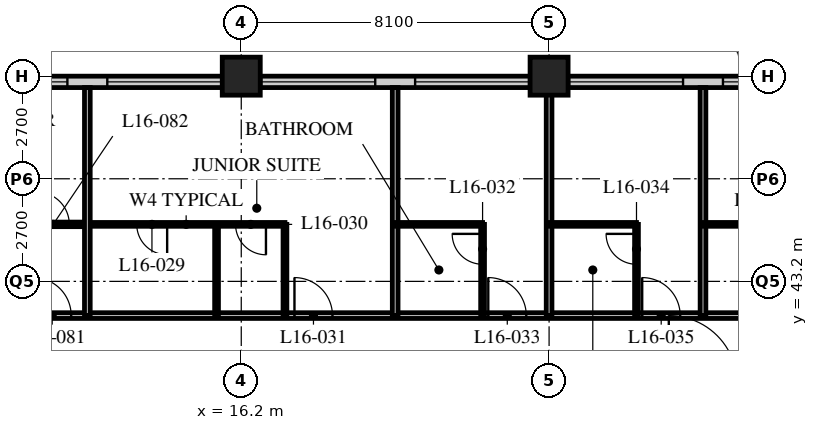
"""IFC4 building model, lengths in metres.
Left out: names, types, materials, properties, quantities, classifications, styles, units other than length and angle.
Written with IfcOpenShell. Run it as: python <this file> out.ifc"""

import sys

from ifc_helpers import new_model, si_unit, direction, frame, frame_2d, origin, origin_2d, place, context, subcontext, project, spatial, rectangle, hollow_rectangle, extrude, element, fill, save


model = new_model("IFC4")
c1 = context("Model", 3, precision=1e-05, world=origin(), true_north=direction((0.0, 1.0)))
c2 = subcontext(c1, "Body", "Model", "MODEL_VIEW")
j1 = project(units=[si_unit("LENGTHUNIT", "METRE"), si_unit("PLANEANGLEUNIT", "RADIAN")], contexts=[c1])
p1 = place(None, origin())
s1 = spatial("IfcSite", under=j1, at=p1, CompositionType="ELEMENT")
p2 = place(p1, origin())
s2 = spatial("IfcBuilding", under=s1, at=p2, CompositionType="ELEMENT")
p3 = place(p2, frame((0.0, 0.0, 67.0)))
s3 = spatial("IfcBuildingStorey", under=s2, at=p3, CompositionType="ELEMENT", Elevation=67.0)
for number, where, z_axis, x_axis in (
    (1, (16.2, 48.6, 0.0), (0.0, 0.0, 1.0), (1.0, 0.0, 0.0)),
    (2, (24.3, 48.6, 0.0), (0.0, 0.0, 1.0), (1.0, 0.0, 0.0)),
):
    element("IfcColumn", number, at=place(p3, frame(where, z_axis=z_axis, x_axis=x_axis)), inside=s3, PredefinedType="COLUMN", context=c2, shape_type="SweptSolid", body=[
        extrude(hollow_rectangle(XDim=1.0, YDim=1.0, WallThickness=0.1, at=origin_2d()), origin(), (0.0, 0.0, 1.0), 3.4),
    ])
p4 = place(p3, frame((48.3, 48.45, 0.0), z_axis=(0.0, 0.0, 1.0), x_axis=(-1.0, 0.0, 0.0)))
e3 = element("IfcWall", 3, at=p4, inside=s3, PredefinedType="SOLIDWALL", context=c2, shape_type="SweptSolid", body=[
    extrude(rectangle(XDim=40.2, YDim=0.3, at=frame_2d((20.1, 0.0))), origin(), (0.0, 0.0, 1.0), 3.19),
])
p5 = place(p4, frame((0.225, 0.0, 0.9)))
e4 = element("IfcOpeningElement", 4, at=p5, cuts=e3, PredefinedType="OPENING", context=c2, shape_type="SweptSolid", body=[
    extrude(rectangle(XDim=3.0, YDim=2.0, at=frame_2d((1.5, 1.0))), frame((0.0, 0.16, 0.0), z_axis=(0.0, -1.0, 0.0), x_axis=(1.0, 0.0, 0.0)), (0.0, 0.0, 1.0), 0.32),
])
p6 = place(p4, frame((4.275, 0.0, 0.9)))
e5 = element("IfcOpeningElement", 5, at=p6, cuts=e3, PredefinedType="OPENING", context=c2, shape_type="SweptSolid", body=[
    extrude(rectangle(XDim=3.0, YDim=2.0, at=frame_2d((1.5, 1.0))), frame((0.0, 0.16, 0.0), z_axis=(0.0, -1.0, 0.0), x_axis=(1.0, 0.0, 0.0)), (0.0, 0.0, 1.0), 0.32),
])
p7 = place(p4, frame((8.325, 0.0, 0.9)))
e6 = element("IfcOpeningElement", 6, at=p7, cuts=e3, PredefinedType="OPENING", context=c2, shape_type="SweptSolid", body=[
    extrude(rectangle(XDim=3.0, YDim=2.0, at=frame_2d((1.5, 1.0))), frame((0.0, 0.16, 0.0), z_axis=(0.0, -1.0, 0.0), x_axis=(1.0, 0.0, 0.0)), (0.0, 0.0, 1.0), 0.32),
])
p8 = place(p4, frame((12.375, 0.0, 0.9)))
e7 = element("IfcOpeningElement", 7, at=p8, cuts=e3, PredefinedType="OPENING", context=c2, shape_type="SweptSolid", body=[
    extrude(rectangle(XDim=3.0, YDim=2.0, at=frame_2d((1.5, 1.0))), frame((0.0, 0.16, 0.0), z_axis=(0.0, -1.0, 0.0), x_axis=(1.0, 0.0, 0.0)), (0.0, 0.0, 1.0), 0.32),
])
p9 = place(p4, frame((16.425, 0.0, 0.9)))
e8 = element("IfcOpeningElement", 8, at=p9, cuts=e3, PredefinedType="OPENING", context=c2, shape_type="SweptSolid", body=[
    extrude(rectangle(XDim=3.0, YDim=2.0, at=frame_2d((1.5, 1.0))), frame((0.0, 0.16, 0.0), z_axis=(0.0, -1.0, 0.0), x_axis=(1.0, 0.0, 0.0)), (0.0, 0.0, 1.0), 0.32),
])
p10 = place(p4, frame((20.475, 0.0, 0.9)))
e9 = element("IfcOpeningElement", 9, at=p10, cuts=e3, PredefinedType="OPENING", context=c2, shape_type="SweptSolid", body=[
    extrude(rectangle(XDim=3.0, YDim=2.0, at=frame_2d((1.5, 1.0))), frame((0.0, 0.16, 0.0), z_axis=(0.0, -1.0, 0.0), x_axis=(1.0, 0.0, 0.0)), (0.0, 0.0, 1.0), 0.32),
])
p11 = place(p4, frame((24.525, 0.0, 0.9)))
e10 = element("IfcOpeningElement", 10, at=p11, cuts=e3, PredefinedType="OPENING", context=c2, shape_type="SweptSolid", body=[
    extrude(rectangle(XDim=3.0, YDim=2.0, at=frame_2d((1.5, 1.0))), frame((0.0, 0.16, 0.0), z_axis=(0.0, -1.0, 0.0), x_axis=(1.0, 0.0, 0.0)), (0.0, 0.0, 1.0), 0.32),
])
p12 = place(p4, frame((28.575, 0.0, 0.9)))
e11 = element("IfcOpeningElement", 11, at=p12, cuts=e3, PredefinedType="OPENING", context=c2, shape_type="SweptSolid", body=[
    extrude(rectangle(XDim=3.0, YDim=2.0, at=frame_2d((1.5, 1.0))), frame((0.0, 0.16, 0.0), z_axis=(0.0, -1.0, 0.0), x_axis=(1.0, 0.0, 0.0)), (0.0, 0.0, 1.0), 0.32),
])
p13 = place(p4, frame((32.625, 0.0, 0.9)))
e12 = element("IfcOpeningElement", 12, at=p13, cuts=e3, PredefinedType="OPENING", context=c2, shape_type="SweptSolid", body=[
    extrude(rectangle(XDim=3.0, YDim=2.0, at=frame_2d((1.5, 1.0))), frame((0.0, 0.16, 0.0), z_axis=(0.0, -1.0, 0.0), x_axis=(1.0, 0.0, 0.0)), (0.0, 0.0, 1.0), 0.32),
])
p14 = place(p4, frame((36.675, 0.0, 0.9)))
e13 = element("IfcOpeningElement", 13, at=p14, cuts=e3, PredefinedType="OPENING", context=c2, shape_type="SweptSolid", body=[
    extrude(rectangle(XDim=3.0, YDim=2.0, at=frame_2d((1.5, 1.0))), frame((0.0, 0.16, 0.0), z_axis=(0.0, -1.0, 0.0), x_axis=(1.0, 0.0, 0.0)), (0.0, 0.0, 1.0), 0.32),
])
p15 = place(p3, frame((8.1, 42.3, 0.0), z_axis=(0.0, 0.0, 1.0), x_axis=(1.0, 0.0, 0.0)))
e14 = element("IfcWall", 14, at=p15, inside=s3, PredefinedType="PARTITIONING", context=c2, shape_type="SweptSolid", body=[
    extrude(rectangle(XDim=36.45, YDim=0.15, at=frame_2d((18.225, 0.0))), origin(), (0.0, 0.0, 1.0), 3.19),
])
p16 = place(p15, frame((9.5, 0.0, 0.0)))
e15 = element("IfcOpeningElement", 15, at=p16, cuts=e14, PredefinedType="OPENING", context=c2, shape_type="SweptSolid", body=[
    extrude(rectangle(XDim=1.0, YDim=2.1, at=frame_2d((0.5, 1.05))), frame((0.0, 0.085, 0.0), z_axis=(0.0, -1.0, 0.0), x_axis=(1.0, 0.0, 0.0)), (0.0, 0.0, 1.0), 0.17),
])
p17 = place(p15, frame((14.6, 0.0, 0.0)))
e16 = element("IfcOpeningElement", 16, at=p17, cuts=e14, PredefinedType="OPENING", context=c2, shape_type="SweptSolid", body=[
    extrude(rectangle(XDim=1.0, YDim=2.1, at=frame_2d((0.5, 1.05))), frame((0.0, 0.085, 0.0), z_axis=(0.0, -1.0, 0.0), x_axis=(1.0, 0.0, 0.0)), (0.0, 0.0, 1.0), 0.17),
])
p18 = place(p15, frame((18.65, 0.0, 0.0)))
e17 = element("IfcOpeningElement", 17, at=p18, cuts=e14, PredefinedType="OPENING", context=c2, shape_type="SweptSolid", body=[
    extrude(rectangle(XDim=1.0, YDim=2.1, at=frame_2d((0.5, 1.05))), frame((0.0, 0.085, 0.0), z_axis=(0.0, -1.0, 0.0), x_axis=(1.0, 0.0, 0.0)), (0.0, 0.0, 1.0), 0.17),
])
p19 = place(p15, frame((25.7, 0.0, 0.0)))
e18 = element("IfcOpeningElement", 18, at=p19, cuts=e14, PredefinedType="OPENING", context=c2, shape_type="SweptSolid", body=[
    extrude(rectangle(XDim=1.0, YDim=2.1, at=frame_2d((0.5, 1.05))), frame((0.0, 0.085, 0.0), z_axis=(0.0, -1.0, 0.0), x_axis=(1.0, 0.0, 0.0)), (0.0, 0.0, 1.0), 0.17),
])
p20 = place(p15, frame((30.8, 0.0, 0.0)))
e19 = element("IfcOpeningElement", 19, at=p20, cuts=e14, PredefinedType="OPENING", context=c2, shape_type="SweptSolid", body=[
    extrude(rectangle(XDim=1.0, YDim=2.1, at=frame_2d((0.5, 1.05))), frame((0.0, 0.085, 0.0), z_axis=(0.0, -1.0, 0.0), x_axis=(1.0, 0.0, 0.0)), (0.0, 0.0, 1.0), 0.17),
])
p21 = place(p15, frame((32.825, 0.0, 0.0)))
e20 = element("IfcOpeningElement", 20, at=p21, cuts=e14, PredefinedType="OPENING", context=c2, shape_type="SweptSolid", body=[
    extrude(rectangle(XDim=1.0, YDim=2.1, at=frame_2d((0.5, 1.05))), frame((0.0, 0.085, 0.0), z_axis=(0.0, -1.0, 0.0), x_axis=(1.0, 0.0, 0.0)), (0.0, 0.0, 1.0), 0.17),
])
p22 = place(p15, frame((2.625, 0.0, 0.0)))
e21 = element("IfcOpeningElement", 21, at=p22, cuts=e14, PredefinedType="OPENING", context=c2, shape_type="SweptSolid", body=[
    extrude(rectangle(XDim=1.0, YDim=2.1, at=frame_2d((0.5, 1.05))), frame((0.0, 0.085, 0.0), z_axis=(0.0, -1.0, 0.0), x_axis=(1.0, 0.0, 0.0)), (0.0, 0.0, 1.0), 0.17),
])
p23 = place(p3, frame((12.15, 44.7, 0.0), z_axis=(0.0, 0.0, 1.0), x_axis=(1.0, 0.0, 0.0)))
e22 = element("IfcWall", 22, at=p23, inside=s3, PredefinedType="PARTITIONING", context=c2, shape_type="SweptSolid", body=[
    extrude(rectangle(XDim=5.2, YDim=0.1, at=frame_2d((2.6, 0.0))), origin(), (0.0, 0.0, 1.0), 3.19),
])
p24 = place(p23, frame((1.3, 0.0, 0.0)))
e23 = element("IfcOpeningElement", 23, at=p24, cuts=e22, PredefinedType="OPENING", context=c2, shape_type="SweptSolid", body=[
    extrude(rectangle(XDim=0.8, YDim=2.1, at=frame_2d((0.4, 1.05))), frame((0.0, 0.06, 0.0), z_axis=(0.0, -1.0, 0.0), x_axis=(1.0, 0.0, 0.0)), (0.0, 0.0, 1.0), 0.12),
])
p25 = place(p23, frame((3.9, 0.0, 0.0)))
e24 = element("IfcOpeningElement", 24, at=p25, cuts=e22, PredefinedType="OPENING", context=c2, shape_type="SweptSolid", body=[
    extrude(rectangle(XDim=0.8, YDim=2.1, at=frame_2d((0.4, 1.05))), frame((0.0, 0.06, 0.0), z_axis=(0.0, -1.0, 0.0), x_axis=(1.0, 0.0, 0.0)), (0.0, 0.0, 1.0), 0.12),
])
for number, where, z_axis, x_axis in (
    (25, (15.55, 42.3, 0.0), (0.0, 0.0, 1.0), (0.0, 1.0, 0.0)),
    (26, (17.35, 42.3, 0.0), (0.0, 0.0, 1.0), (0.0, 1.0, 0.0)),
):
    element("IfcWall", number, at=place(p3, frame(where, z_axis=z_axis, x_axis=x_axis)), inside=s3, PredefinedType="PARTITIONING", context=c2, shape_type="SweptSolid", body=[
        extrude(rectangle(XDim=2.4, YDim=0.1, at=frame_2d((1.2, 0.0))), origin(), (0.0, 0.0, 1.0), 3.19),
    ])
p26 = place(p3, frame((20.25, 42.3, 0.0), z_axis=(0.0, 0.0, 1.0), x_axis=(0.0, 1.0, 0.0)))
e27 = element("IfcWall", 27, at=p26, inside=s3, PredefinedType="PARTITIONING", context=c2, shape_type="SweptSolid", body=[
    extrude(rectangle(XDim=6.0, YDim=0.15, at=frame_2d((3.0, 0.0))), origin(), (0.0, 0.0, 1.0), 3.19),
])
p27 = place(p3, frame((20.25, 44.7, 0.0), z_axis=(0.0, 0.0, 1.0), x_axis=(1.0, 0.0, 0.0)))
e28 = element("IfcWall", 28, at=p27, inside=s3, PredefinedType="PARTITIONING", context=c2, shape_type="SweptSolid", body=[
    extrude(rectangle(XDim=2.3, YDim=0.1, at=frame_2d((1.15, 0.0))), origin(), (0.0, 0.0, 1.0), 3.19),
])
p28 = place(p3, frame((22.55, 42.3, 0.0), z_axis=(0.0, 0.0, 1.0), x_axis=(0.0, 1.0, 0.0)))
e29 = element("IfcWall", 29, at=p28, inside=s3, PredefinedType="PARTITIONING", context=c2, shape_type="SweptSolid", body=[
    extrude(rectangle(XDim=2.4, YDim=0.1, at=frame_2d((1.2, 0.0))), origin(), (0.0, 0.0, 1.0), 3.19),
])
p29 = place(p28, frame((1.35, 0.0, 0.0)))
e30 = element("IfcOpeningElement", 30, at=p29, cuts=e29, PredefinedType="OPENING", context=c2, shape_type="SweptSolid", body=[
    extrude(rectangle(XDim=0.8, YDim=2.1, at=frame_2d((0.4, 1.05))), frame((0.0, 0.06, 0.0), z_axis=(0.0, -1.0, 0.0), x_axis=(1.0, 0.0, 0.0)), (0.0, 0.0, 1.0), 0.12),
])
p30 = place(p3, frame((24.3, 42.3, 0.0), z_axis=(0.0, 0.0, 1.0), x_axis=(0.0, 1.0, 0.0)))
e31 = element("IfcWall", 31, at=p30, inside=s3, PredefinedType="PARTITIONING", context=c2, shape_type="SweptSolid", body=[
    extrude(rectangle(XDim=6.0, YDim=0.15, at=frame_2d((3.0, 0.0))), origin(), (0.0, 0.0, 1.0), 2.578),
])
p31 = place(p3, frame((24.3, 44.7, 0.0), z_axis=(0.0, 0.0, 1.0), x_axis=(1.0, 0.0, 0.0)))
e32 = element("IfcWall", 32, at=p31, inside=s3, PredefinedType="PARTITIONING", context=c2, shape_type="SweptSolid", body=[
    extrude(rectangle(XDim=2.3, YDim=0.1, at=frame_2d((1.15, 0.0))), origin(), (0.0, 0.0, 1.0), 3.19),
])
p32 = place(p3, frame((26.6, 42.3, 0.0), z_axis=(0.0, 0.0, 1.0), x_axis=(0.0, 1.0, 0.0)))
e33 = element("IfcWall", 33, at=p32, inside=s3, PredefinedType="PARTITIONING", context=c2, shape_type="SweptSolid", body=[
    extrude(rectangle(XDim=2.4, YDim=0.1, at=frame_2d((1.2, 0.0))), origin(), (0.0, 0.0, 1.0), 3.19),
])
p33 = place(p32, frame((1.35, 0.0, 0.0)))
e34 = element("IfcOpeningElement", 34, at=p33, cuts=e33, PredefinedType="OPENING", context=c2, shape_type="SweptSolid", body=[
    extrude(rectangle(XDim=0.8, YDim=2.1, at=frame_2d((0.4, 1.05))), frame((0.0, 0.06, 0.0), z_axis=(0.0, -1.0, 0.0), x_axis=(1.0, 0.0, 0.0)), (0.0, 0.0, 1.0), 0.12),
])
p34 = place(p3, frame((28.35, 42.3, 0.0), z_axis=(0.0, 0.0, 1.0), x_axis=(0.0, 1.0, 0.0)))
e35 = element("IfcWall", 35, at=p34, inside=s3, PredefinedType="PARTITIONING", context=c2, shape_type="SweptSolid", body=[
    extrude(rectangle(XDim=6.0, YDim=0.15, at=frame_2d((3.0, 0.0))), origin(), (0.0, 0.0, 1.0), 3.19),
])
p35 = place(p3, frame((28.35, 44.7, 0.0), z_axis=(0.0, 0.0, 1.0), x_axis=(1.0, 0.0, 0.0)))
e36 = element("IfcWall", 36, at=p35, inside=s3, PredefinedType="PARTITIONING", context=c2, shape_type="SweptSolid", body=[
    extrude(rectangle(XDim=5.2, YDim=0.1, at=frame_2d((2.6, 0.0))), origin(), (0.0, 0.0, 1.0), 3.19),
])
p36 = place(p35, frame((1.3, 0.0, 0.0)))
e37 = element("IfcOpeningElement", 37, at=p36, cuts=e36, PredefinedType="OPENING", context=c2, shape_type="SweptSolid", body=[
    extrude(rectangle(XDim=0.8, YDim=2.1, at=frame_2d((0.4, 1.05))), frame((0.0, 0.06, 0.0), z_axis=(0.0, -1.0, 0.0), x_axis=(1.0, 0.0, 0.0)), (0.0, 0.0, 1.0), 0.12),
])
p37 = place(p35, frame((3.9, 0.0, 0.0)))
e38 = element("IfcOpeningElement", 38, at=p37, cuts=e36, PredefinedType="OPENING", context=c2, shape_type="SweptSolid", body=[
    extrude(rectangle(XDim=0.8, YDim=2.1, at=frame_2d((0.4, 1.05))), frame((0.0, 0.06, 0.0), z_axis=(0.0, -1.0, 0.0), x_axis=(1.0, 0.0, 0.0)), (0.0, 0.0, 1.0), 0.12),
])
p38 = place(p3, frame((8.1, 44.7, 0.0), z_axis=(0.0, 0.0, 1.0), x_axis=(1.0, 0.0, 0.0)))
e39 = element("IfcWall", 39, at=p38, inside=s3, PredefinedType="PARTITIONING", context=c2, shape_type="SweptSolid", body=[
    extrude(rectangle(XDim=4.05, YDim=0.12, at=frame_2d((2.025, 0.0))), origin(), (0.0, 0.0, 1.0), 3.19),
])
p39 = place(p38, frame((2.725, 0.0, 0.0)))
e40 = element("IfcOpeningElement", 40, at=p39, cuts=e39, PredefinedType="OPENING", context=c2, shape_type="SweptSolid", body=[
    extrude(rectangle(XDim=0.85, YDim=2.1, at=frame_2d((0.425, 1.05))), frame((0.0, 0.07, 0.0), z_axis=(0.0, -1.0, 0.0), x_axis=(1.0, 0.0, 0.0)), (0.0, 0.0, 1.0), 0.14),
])
p40 = place(p3, frame((12.15, 42.3, 0.0), z_axis=(0.0, 0.0, 1.0), x_axis=(0.0, 1.0, 0.0)))
e41 = element("IfcWall", 41, at=p40, inside=s3, PredefinedType="PARTITIONING", context=c2, shape_type="SweptSolid", body=[
    extrude(rectangle(XDim=6.0, YDim=0.15, at=frame_2d((3.0, 0.0))), origin(), (0.0, 0.0, 1.0), 3.19),
])
p41 = place(p9, origin())
e42 = element("IfcWindow", 42, at=p41, inside=s3, PartitioningType="SINGLE_PANEL", PredefinedType="WINDOW", context=c2, shape_type="SweptSolid", body=[
    extrude(rectangle(XDim=3.0, YDim=2.0, at=frame_2d((1.5, 1.0))), frame((0.0, 0.03, 0.0), z_axis=(0.0, -1.0, 0.0), x_axis=(1.0, 0.0, 0.0)), (0.0, 0.0, 1.0), 0.06),
])
fill(e8, e42)
p42 = place(p10, origin())
e43 = element("IfcWindow", 43, at=p42, inside=s3, PartitioningType="SINGLE_PANEL", PredefinedType="WINDOW", context=c2, shape_type="SweptSolid", body=[
    extrude(rectangle(XDim=3.0, YDim=2.0, at=frame_2d((1.5, 1.0))), frame((0.0, 0.03, 0.0), z_axis=(0.0, -1.0, 0.0), x_axis=(1.0, 0.0, 0.0)), (0.0, 0.0, 1.0), 0.06),
])
fill(e9, e43)
p43 = place(p11, origin())
e44 = element("IfcWindow", 44, at=p43, inside=s3, PartitioningType="SINGLE_PANEL", PredefinedType="WINDOW", context=c2, shape_type="SweptSolid", body=[
    extrude(rectangle(XDim=3.0, YDim=2.0, at=frame_2d((1.5, 1.0))), frame((0.0, 0.03, 0.0), z_axis=(0.0, -1.0, 0.0), x_axis=(1.0, 0.0, 0.0)), (0.0, 0.0, 1.0), 0.06),
])
fill(e10, e44)
p44 = place(p12, origin())
e45 = element("IfcWindow", 45, at=p44, inside=s3, PartitioningType="SINGLE_PANEL", PredefinedType="WINDOW", context=c2, shape_type="SweptSolid", body=[
    extrude(rectangle(XDim=3.0, YDim=2.0, at=frame_2d((1.5, 1.0))), frame((0.0, 0.03, 0.0), z_axis=(0.0, -1.0, 0.0), x_axis=(1.0, 0.0, 0.0)), (0.0, 0.0, 1.0), 0.06),
])
fill(e11, e45)
p45 = place(p13, origin())
e46 = element("IfcWindow", 46, at=p45, inside=s3, PartitioningType="SINGLE_PANEL", PredefinedType="WINDOW", context=c2, shape_type="SweptSolid", body=[
    extrude(rectangle(XDim=3.0, YDim=2.0, at=frame_2d((1.5, 1.0))), frame((0.0, 0.03, 0.0), z_axis=(0.0, -1.0, 0.0), x_axis=(1.0, 0.0, 0.0)), (0.0, 0.0, 1.0), 0.06),
])
fill(e12, e46)
p46 = place(p14, origin())
e47 = element("IfcWindow", 47, at=p46, inside=s3, PartitioningType="SINGLE_PANEL", PredefinedType="WINDOW", context=c2, shape_type="SweptSolid", body=[
    extrude(rectangle(XDim=3.0, YDim=2.0, at=frame_2d((1.5, 1.0))), frame((0.0, 0.03, 0.0), z_axis=(0.0, -1.0, 0.0), x_axis=(1.0, 0.0, 0.0)), (0.0, 0.0, 1.0), 0.06),
])
fill(e13, e47)
p47 = place(p24, origin())
e48 = element("IfcDoor", 48, at=p47, inside=s3, OperationType="SINGLE_SWING_LEFT", PredefinedType="DOOR", context=c2, shape_type="SweptSolid", body=[
    extrude(rectangle(XDim=0.8, YDim=2.1, at=frame_2d((0.4, 1.05))), frame((0.0, 0.025, 0.0), z_axis=(0.0, -1.0, 0.0), x_axis=(1.0, 0.0, 0.0)), (0.0, 0.0, 1.0), 0.05),
])
fill(e23, e48)
p48 = place(p25, origin())
e49 = element("IfcDoor", 49, at=p48, inside=s3, OperationType="SINGLE_SWING_LEFT", PredefinedType="DOOR", context=c2, shape_type="SweptSolid", body=[
    extrude(rectangle(XDim=0.8, YDim=2.1, at=frame_2d((0.4, 1.05))), frame((0.0, 0.025, 0.0), z_axis=(0.0, -1.0, 0.0), x_axis=(1.0, 0.0, 0.0)), (0.0, 0.0, 1.0), 0.05),
])
fill(e24, e49)
p49 = place(p16, origin())
e50 = element("IfcDoor", 50, at=p49, inside=s3, OperationType="SINGLE_SWING_LEFT", PredefinedType="DOOR", context=c2, shape_type="SweptSolid", body=[
    extrude(rectangle(XDim=1.0, YDim=2.1, at=frame_2d((0.5, 1.05))), frame((0.0, 0.025, 0.0), z_axis=(0.0, -1.0, 0.0), x_axis=(1.0, 0.0, 0.0)), (0.0, 0.0, 1.0), 0.05),
])
fill(e15, e50)
p50 = place(p29, origin())
e51 = element("IfcDoor", 51, at=p50, inside=s3, OperationType="SINGLE_SWING_RIGHT", PredefinedType="DOOR", context=c2, shape_type="SweptSolid", body=[
    extrude(rectangle(XDim=0.8, YDim=2.1, at=frame_2d((0.4, 1.05))), frame((0.0, 0.025, 0.0), z_axis=(0.0, -1.0, 0.0), x_axis=(1.0, 0.0, 0.0)), (0.0, 0.0, 1.0), 0.05),
])
fill(e30, e51)
p51 = place(p17, origin())
e52 = element("IfcDoor", 52, at=p51, inside=s3, OperationType="SINGLE_SWING_LEFT", PredefinedType="DOOR", context=c2, shape_type="SweptSolid", body=[
    extrude(rectangle(XDim=1.0, YDim=2.1, at=frame_2d((0.5, 1.05))), frame((0.0, 0.025, 0.0), z_axis=(0.0, -1.0, 0.0), x_axis=(1.0, 0.0, 0.0)), (0.0, 0.0, 1.0), 0.05),
])
fill(e16, e52)
p52 = place(p33, origin())
e53 = element("IfcDoor", 53, at=p52, inside=s3, OperationType="SINGLE_SWING_RIGHT", PredefinedType="DOOR", context=c2, shape_type="SweptSolid", body=[
    extrude(rectangle(XDim=0.8, YDim=2.1, at=frame_2d((0.4, 1.05))), frame((0.0, 0.025, 0.0), z_axis=(0.0, -1.0, 0.0), x_axis=(1.0, 0.0, 0.0)), (0.0, 0.0, 1.0), 0.05),
])
fill(e34, e53)
p53 = place(p18, origin())
e54 = element("IfcDoor", 54, at=p53, inside=s3, OperationType="SINGLE_SWING_LEFT", PredefinedType="DOOR", context=c2, shape_type="SweptSolid", body=[
    extrude(rectangle(XDim=1.0, YDim=2.1, at=frame_2d((0.5, 1.05))), frame((0.0, 0.025, 0.0), z_axis=(0.0, -1.0, 0.0), x_axis=(1.0, 0.0, 0.0)), (0.0, 0.0, 1.0), 0.05),
])
fill(e17, e54)
p54 = place(p22, origin())
e55 = element("IfcDoor", 55, at=p54, inside=s3, OperationType="SINGLE_SWING_LEFT", PredefinedType="DOOR", context=c2, shape_type="SweptSolid", body=[
    extrude(rectangle(XDim=1.0, YDim=2.1, at=frame_2d((0.5, 1.05))), frame((0.0, 0.025, 0.0), z_axis=(0.0, -1.0, 0.0), x_axis=(1.0, 0.0, 0.0)), (0.0, 0.0, 1.0), 0.05),
])
fill(e21, e55)
p55 = place(p39, origin())
e56 = element("IfcDoor", 56, at=p55, inside=s3, OperationType="SINGLE_SWING_LEFT", PredefinedType="DOOR", context=c2, shape_type="SweptSolid", body=[
    extrude(rectangle(XDim=0.85, YDim=2.1, at=frame_2d((0.425, 1.05))), frame((0.0, 0.025, 0.0), z_axis=(0.0, -1.0, 0.0), x_axis=(1.0, 0.0, 0.0)), (0.0, 0.0, 1.0), 0.05),
])
fill(e40, e56)
save(model, sys.argv[1])
